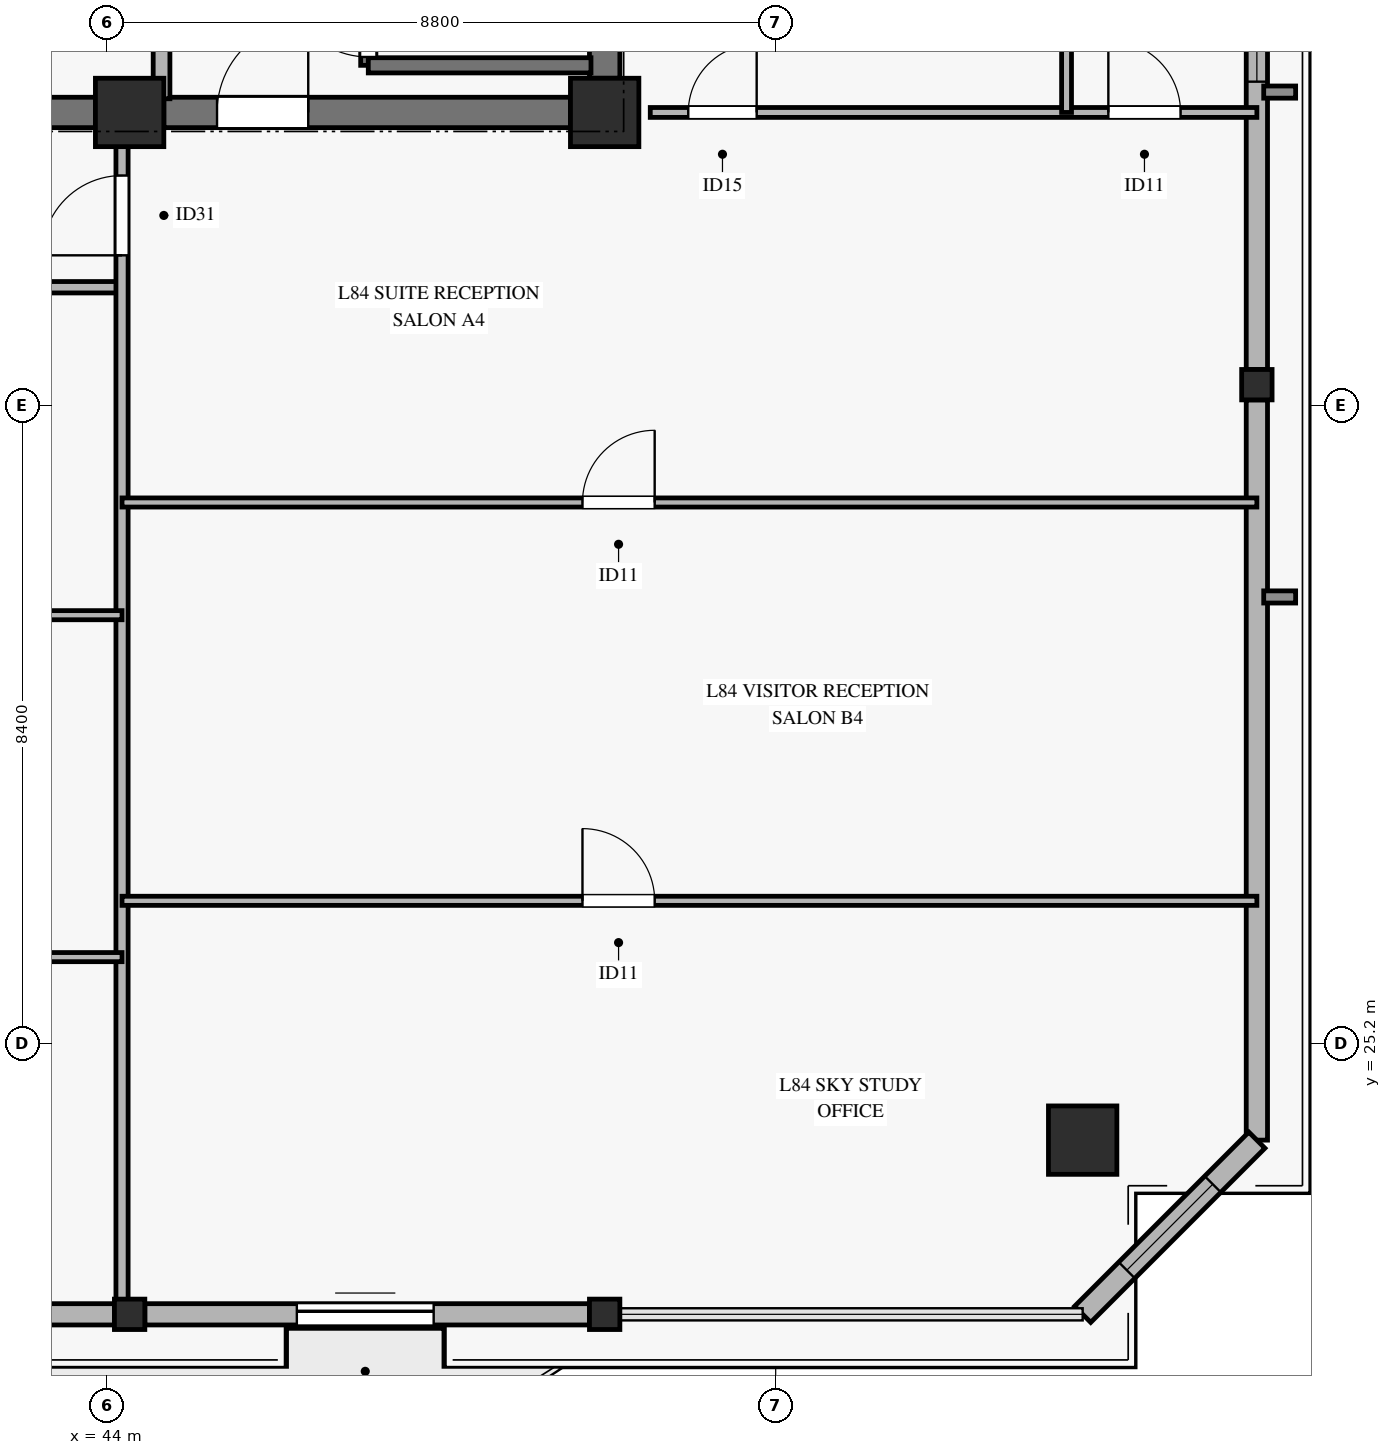
"""IFC4 building model, lengths in metres.
Left out: names, types, materials, properties, quantities, classifications, styles, units other than length and angle.
Written with IfcOpenShell. Run it as: python <this file> out.ifc"""

import sys

from ifc_helpers import new_model, si_unit, direction, frame, frame_2d, origin, origin_2d, place, context, subcontext, project, spatial, rectangle, hollow_rectangle, extrude, source, transform, mapped, element, fill, save


model = new_model("IFC4")
c1 = context("Model", 3, precision=1e-05, world=origin(), true_north=direction((0.0, 1.0)))
c2 = subcontext(c1, "Body", "Model", "MODEL_VIEW")
j1 = project(units=[si_unit("LENGTHUNIT", "METRE"), si_unit("PLANEANGLEUNIT", "RADIAN")], contexts=[c1])
p1 = place(None, origin())
s1 = spatial("IfcSite", under=j1, at=p1, CompositionType="ELEMENT")
p2 = place(p1, origin())
s2 = spatial("IfcBuilding", under=s1, at=p2, CompositionType="ELEMENT")
p3 = place(p2, frame((0.0, 0.0, 324.4)))
s3 = spatial("IfcBuildingStorey", under=s2, at=p3, CompositionType="ELEMENT", Elevation=324.4)
m1 = source(origin(), c2, "Body", "SweptSolid", [
    extrude(rectangle(XDim=0.9, YDim=0.9, at=origin_2d()), origin(), (0.0, 0.0, 1.0), 3.12),
])
for number, where, z_axis, x_axis in (
    (1, (44.3, 37.45, 0.0), (0.0, 0.0, 1.0), (1.0, 0.0, 0.0)),
    (2, (50.55, 37.45, 0.0), (0.0, 0.0, 1.0), (1.0, 0.0, 0.0)),
):
    element("IfcColumn", number, at=place(p3, frame(where, z_axis=z_axis, x_axis=x_axis)), inside=s3, PredefinedType="PILASTER", context=c2, shape_type="MappedRepresentation", body=[
        mapped(m1, transform((0.0, 0.0, 0.0), x_axis=(1.0, 0.0, 0.0), y_axis=(0.0, 1.0, 0.0), z_axis=(0.0, 0.0, 1.0), scale=1.0)),
    ])
p4 = place(p3, frame((36.05, 37.45, 0.0), z_axis=(0.0, 0.0, 1.0), x_axis=(1.0, 0.0, 0.0)))
e3 = element("IfcWall", 3, at=p4, inside=s3, PredefinedType="SHEAR", context=c2, shape_type="SweptSolid", body=[
    extrude(rectangle(XDim=7.8, YDim=0.4, at=frame_2d((3.9, 0.0))), origin(), (0.0, 0.0, 1.0), 3.12),
])
p5 = place(p3, frame((44.75, 37.45, 0.0), z_axis=(0.0, 0.0, 1.0), x_axis=(1.0, 0.0, 0.0)))
e4 = element("IfcWall", 4, at=p5, inside=s3, PredefinedType="SHEAR", context=c2, shape_type="SweptSolid", body=[
    extrude(rectangle(XDim=5.35, YDim=0.4, at=frame_2d((2.675, 0.0))), origin(), (0.0, 0.0, 1.0), 3.12),
])
p6 = place(p5, frame((0.7, 0.0, 0.0)))
e5 = element("IfcOpeningElement", 5, at=p6, cuts=e4, PredefinedType="OPENING", context=c2, shape_type="SweptSolid", body=[
    extrude(rectangle(XDim=1.2, YDim=2.15, at=frame_2d((0.6, 1.075))), frame((0.0, 0.21, 0.0), z_axis=(0.0, -1.0, 0.0), x_axis=(1.0, 0.0, 0.0)), (0.0, 0.0, 1.0), 0.42),
])
p7 = place(p3, frame((50.55, 37.9, 0.0), z_axis=(0.0, 0.0, 1.0), x_axis=(0.0, 1.0, 0.0)))
e6 = element("IfcWall", 6, at=p7, inside=s3, PredefinedType="SHEAR", context=c2, shape_type="SweptSolid", body=[
    extrude(rectangle(XDim=8.2, YDim=0.4, at=frame_2d((4.1, 0.0))), origin(), (0.0, 0.0, 1.0), 3.12),
])
m2 = source(origin(), c2, "Body", "SweptSolid", [
    extrude(hollow_rectangle(XDim=0.9, YDim=0.9, WallThickness=0.04, at=origin_2d()), origin(), (0.0, 0.0, 1.0), 3.12),
])
p8 = place(p3, frame((56.839, 23.928, 0.0), z_axis=(0.0, 0.0, 1.0), x_axis=(1.0, 0.0, 0.0)))
e7 = element("IfcColumn", 7, at=p8, inside=s3, PredefinedType="COLUMN", context=c2, shape_type="MappedRepresentation", body=[
    mapped(m2, transform((0.0, 0.0, 0.0), x_axis=(1.0, 0.0, 0.0), y_axis=(0.0, 1.0, 0.0), z_axis=(0.0, 0.0, 1.0), scale=1.0)),
])
m3 = source(origin(), c2, "Body", "SweptSolid", [
    extrude(hollow_rectangle(XDim=0.4, YDim=0.4, WallThickness=0.02, at=origin_2d()), origin(), (0.0, 0.0, 1.0), 3.12),
])
for number, where, z_axis, x_axis in (
    (8, (44.3, 21.636, 0.0), (0.0, 0.0, 1.0), (1.0, 0.0, 0.0)),
    (9, (50.55, 21.636, 0.0), (0.0, 0.0, 1.0), (1.0, 0.0, 0.0)),
    (10, (59.131, 33.868, 0.0), (0.0, 0.0, 1.0), (1.0, 0.0, 0.0)),
):
    element("IfcColumn", number, at=place(p3, frame(where, z_axis=z_axis, x_axis=x_axis)), inside=s3, PredefinedType="COLUMN", context=c2, shape_type="MappedRepresentation", body=[
        mapped(m3, transform((0.0, 0.0, 0.0), x_axis=(1.0, 0.0, 0.0), y_axis=(0.0, 1.0, 0.0), z_axis=(0.0, 0.0, 1.0), scale=1.0)),
    ])
p9 = place(p3, frame((37.75, 21.636, 0.0), z_axis=(0.0, 0.0, 1.0), x_axis=(1.0, 0.0, 0.0)))
e11 = element("IfcWall", 11, at=p9, inside=s3, PredefinedType="SOLIDWALL", context=c2, shape_type="SweptSolid", body=[
    extrude(rectangle(XDim=6.35, YDim=0.28, at=frame_2d((3.175, 0.0))), origin(), (0.0, 0.0, 1.0), 2.75),
])
p10 = place(p3, frame((44.5, 21.636, 0.0), z_axis=(0.0, 0.0, 1.0), x_axis=(1.0, 0.0, 0.0)))
e12 = element("IfcWall", 12, at=p10, inside=s3, PredefinedType="SOLIDWALL", context=c2, shape_type="SweptSolid", body=[
    extrude(rectangle(XDim=5.85, YDim=0.28, at=frame_2d((2.925, 0.0))), origin(), (0.0, 0.0, 1.0), 2.75),
])
p11 = place(p10, frame((2.0, 0.0, 0.0)))
e13 = element("IfcOpeningElement", 13, at=p11, cuts=e12, PredefinedType="OPENING", context=c2, shape_type="SweptSolid", body=[
    extrude(rectangle(XDim=1.8, YDim=2.25, at=frame_2d((0.9, 1.125))), frame((0.0, 0.15, 0.0), z_axis=(0.0, -1.0, 0.0), x_axis=(1.0, 0.0, 0.0)), (0.0, 0.0, 1.0), 0.3),
])
p12 = place(p3, frame((59.131, 23.928, 0.0), z_axis=(0.0, 0.0, 1.0), x_axis=(0.0, 1.0, 0.0)))
e14 = element("IfcWall", 14, at=p12, inside=s3, PredefinedType="SOLIDWALL", context=c2, shape_type="SweptSolid", body=[
    extrude(rectangle(XDim=9.74, YDim=0.28, at=frame_2d((4.87, 0.0))), origin(), (0.0, 0.0, 1.0), 2.75),
])
p13 = place(p3, frame((59.131, 34.068, 0.0), z_axis=(0.0, 0.0, 1.0), x_axis=(0.0, 1.0, 0.0)))
e15 = element("IfcWall", 15, at=p13, inside=s3, PredefinedType="SOLIDWALL", context=c2, shape_type="SweptSolid", body=[
    extrude(rectangle(XDim=9.74, YDim=0.28, at=frame_2d((4.87, 0.0))), origin(), (0.0, 0.0, 1.0), 2.75),
])
p14 = place(p13, frame((3.787, 0.0, 0.45)))
e16 = element("IfcOpeningElement", 16, at=p14, cuts=e15, PredefinedType="OPENING", context=c2, shape_type="SweptSolid", body=[
    extrude(rectangle(XDim=2.2, YDim=2.1, at=frame_2d((1.1, 1.05))), frame((0.0, 0.15, 0.0), z_axis=(0.0, -1.0, 0.0), x_axis=(1.0, 0.0, 0.0)), (0.0, 0.0, 1.0), 0.3),
])
p15 = place(p3, frame((56.839, 21.636, 0.0), z_axis=(0.0, 0.0, 1.0), x_axis=(0.707106781187, 0.707106781187, 0.0)))
e17 = element("IfcWall", 17, at=p15, inside=s3, PredefinedType="SOLIDWALL", context=c2, shape_type="SweptSolid", body=[
    extrude(rectangle(XDim=3.241, YDim=0.3, at=frame_2d((1.621, 0.0))), origin(), (0.0, 0.0, 1.0), 2.75),
])
p16 = place(p15, frame((0.821, 0.0, 0.45)))
e18 = element("IfcOpeningElement", 18, at=p16, cuts=e17, PredefinedType="OPENING", context=c2, shape_type="SweptSolid", body=[
    extrude(rectangle(XDim=1.6, YDim=2.0, at=frame_2d((0.8, 1.0))), frame((0.0, 0.16, 0.0), z_axis=(0.0, -1.0, 0.0), x_axis=(1.0, 0.0, 0.0)), (0.0, 0.0, 1.0), 0.32),
])
p17 = place(p3, frame((47.44, 38.07, 0.0), z_axis=(0.0, 0.0, 1.0), x_axis=(0.0, 1.0, 0.0)))
e19 = element("IfcWall", 19, at=p17, inside=s3, PredefinedType="SOLIDWALL", context=c2, shape_type="SweptSolid", body=[
    extrude(rectangle(XDim=7.25, YDim=0.2, at=frame_2d((3.625, 0.0))), origin(), (0.0, 0.0, 1.0), 3.4),
])
p18 = place(p17, frame((0.11, 0.0, 0.0)))
e20 = element("IfcOpeningElement", 20, at=p18, cuts=e19, PredefinedType="OPENING", context=c2, shape_type="SweptSolid", body=[
    extrude(rectangle(XDim=1.1, YDim=2.15, at=frame_2d((0.55, 1.075))), frame((0.0, 0.11, 0.0), z_axis=(0.0, -1.0, 0.0), x_axis=(1.0, 0.0, 0.0)), (0.0, 0.0, 1.0), 0.22),
])
p19 = place(p3, frame((47.44, 38.07, 0.0), z_axis=(0.0, 0.0, 1.0), x_axis=(1.0, 0.0, 0.0)))
e21 = element("IfcWall", 21, at=p19, inside=s3, PredefinedType="SOLIDWALL", context=c2, shape_type="SweptSolid", body=[
    extrude(rectangle(XDim=2.93, YDim=0.2, at=frame_2d((1.465, 0.0))), origin(), (0.0, 0.0, 1.0), 3.4),
])
p20 = place(p3, frame((44.72, 37.63, 0.0), z_axis=(0.0, 0.0, 1.0), x_axis=(0.0, 1.0, 0.0)))
e22 = element("IfcWall", 22, at=p20, inside=s3, PredefinedType="SOLIDWALL", context=c2, shape_type="SweptSolid", body=[
    extrude(rectangle(XDim=7.59, YDim=0.22, at=frame_2d((3.795, 0.0))), origin(), (0.0, 0.0, 1.0), 3.12),
])
p21 = place(p3, frame((21.0, 35.15, 0.0), z_axis=(0.0, 0.0, 1.0), x_axis=(1.0, 0.0, 0.0)))
e23 = element("IfcWall", 23, at=p21, inside=s3, PredefinedType="PARTITIONING", context=c2, shape_type="SweptSolid", body=[
    extrude(rectangle(XDim=23.2, YDim=0.15, at=frame_2d((11.6, 0.0))), origin(), (0.0, 0.0, 1.0), 2.405),
])
p22 = place(p21, frame((4.577, 0.0, 0.0)))
e24 = element("IfcOpeningElement", 24, at=p22, cuts=e23, PredefinedType="OPENING", context=c2, shape_type="SweptSolid", body=[
    extrude(rectangle(XDim=1.05, YDim=2.15, at=frame_2d((0.525, 1.075))), frame((0.0, 0.085, 0.0), z_axis=(0.0, -1.0, 0.0), x_axis=(1.0, 0.0, 0.0)), (0.0, 0.0, 1.0), 0.17),
])
p23 = place(p21, frame((16.177, 0.0, 0.0)))
e25 = element("IfcOpeningElement", 25, at=p23, cuts=e23, PredefinedType="OPENING", context=c2, shape_type="SweptSolid", body=[
    extrude(rectangle(XDim=1.05, YDim=2.15, at=frame_2d((0.525, 1.075))), frame((0.0, 0.085, 0.0), z_axis=(0.0, -1.0, 0.0), x_axis=(1.0, 0.0, 0.0)), (0.0, 0.0, 1.0), 0.17),
])
p24 = place(p3, frame((44.2, 21.636, 0.0), z_axis=(0.0, 0.0, 1.0), x_axis=(0.0, 1.0, 0.0)))
e26 = element("IfcWall", 26, at=p24, inside=s3, PredefinedType="PARTITIONING", context=c2, shape_type="SweptSolid", body=[
    extrude(rectangle(XDim=15.814, YDim=0.16, at=frame_2d((7.907, 0.0))), origin(), (0.0, 0.0, 1.0), 2.405),
])
p25 = place(p24, frame((13.934, 0.0, 0.0)))
e27 = element("IfcOpeningElement", 27, at=p25, cuts=e26, PredefinedType="OPENING", context=c2, shape_type="SweptSolid", body=[
    extrude(rectangle(XDim=1.05, YDim=2.15, at=frame_2d((0.525, 1.075))), frame((0.0, 0.09, 0.0), z_axis=(0.0, -1.0, 0.0), x_axis=(1.0, 0.0, 0.0)), (0.0, 0.0, 1.0), 0.18),
])
p26 = place(p3, frame((32.6, 26.336, 0.0), z_axis=(0.0, 0.0, 1.0), x_axis=(1.0, 0.0, 0.0)))
e28 = element("IfcWall", 28, at=p26, inside=s3, PredefinedType="PARTITIONING", context=c2, shape_type="SweptSolid", body=[
    extrude(rectangle(XDim=11.6, YDim=0.12, at=frame_2d((5.8, 0.0))), origin(), (0.0, 0.0, 1.0), 2.405),
])
p27 = place(p26, frame((4.806, 0.0, 0.0)))
e29 = element("IfcOpeningElement", 29, at=p27, cuts=e28, PredefinedType="OPENING", context=c2, shape_type="SweptSolid", body=[
    extrude(rectangle(XDim=0.95, YDim=2.1, at=frame_2d((0.475, 1.05))), frame((0.0, 0.07, 0.0), z_axis=(0.0, -1.0, 0.0), x_axis=(1.0, 0.0, 0.0)), (0.0, 0.0, 1.0), 0.14),
])
p28 = place(p3, frame((32.6, 30.835, 0.0), z_axis=(0.0, 0.0, 1.0), x_axis=(1.0, 0.0, 0.0)))
e30 = element("IfcWall", 30, at=p28, inside=s3, PredefinedType="PARTITIONING", context=c2, shape_type="SweptSolid", body=[
    extrude(rectangle(XDim=11.6, YDim=0.12, at=frame_2d((5.8, 0.0))), origin(), (0.0, 0.0, 1.0), 2.405),
])
p29 = place(p28, frame((4.806, 0.0, 0.0)))
e31 = element("IfcOpeningElement", 31, at=p29, cuts=e30, PredefinedType="OPENING", context=c2, shape_type="SweptSolid", body=[
    extrude(rectangle(XDim=0.95, YDim=2.1, at=frame_2d((0.475, 1.05))), frame((0.0, 0.07, 0.0), z_axis=(0.0, -1.0, 0.0), x_axis=(1.0, 0.0, 0.0)), (0.0, 0.0, 1.0), 0.14),
])
p30 = place(p3, frame((44.2, 27.077, 0.0), z_axis=(0.0, 0.0, 1.0), x_axis=(1.0, 0.0, 0.0)))
e32 = element("IfcWall", 32, at=p30, inside=s3, PredefinedType="PARTITIONING", context=c2, shape_type="SweptSolid", body=[
    extrude(rectangle(XDim=14.931, YDim=0.12, at=frame_2d((7.466, 0.0))), origin(), (0.0, 0.0, 1.0), 2.405),
])
p31 = place(p30, frame((6.058, 0.0, 0.0)))
e33 = element("IfcOpeningElement", 33, at=p31, cuts=e32, PredefinedType="OPENING", context=c2, shape_type="SweptSolid", body=[
    extrude(rectangle(XDim=0.95, YDim=2.1, at=frame_2d((0.475, 1.05))), frame((0.0, 0.07, 0.0), z_axis=(0.0, -1.0, 0.0), x_axis=(1.0, 0.0, 0.0)), (0.0, 0.0, 1.0), 0.14),
])
p32 = place(p3, frame((44.2, 32.318, 0.0), z_axis=(0.0, 0.0, 1.0), x_axis=(1.0, 0.0, 0.0)))
e34 = element("IfcWall", 34, at=p32, inside=s3, PredefinedType="PARTITIONING", context=c2, shape_type="SweptSolid", body=[
    extrude(rectangle(XDim=14.931, YDim=0.12, at=frame_2d((7.466, 0.0))), origin(), (0.0, 0.0, 1.0), 2.405),
])
p33 = place(p32, frame((6.058, 0.0, 0.0)))
e35 = element("IfcOpeningElement", 35, at=p33, cuts=e34, PredefinedType="OPENING", context=c2, shape_type="SweptSolid", body=[
    extrude(rectangle(XDim=0.95, YDim=2.1, at=frame_2d((0.475, 1.05))), frame((0.0, 0.07, 0.0), z_axis=(0.0, -1.0, 0.0), x_axis=(1.0, 0.0, 0.0)), (0.0, 0.0, 1.0), 0.14),
])
p34 = place(p3, frame((51.15, 37.45, 0.0), z_axis=(0.0, 0.0, 1.0), x_axis=(1.0, 0.0, 0.0)))
e36 = element("IfcWall", 36, at=p34, inside=s3, PredefinedType="PARTITIONING", context=c2, shape_type="SweptSolid", body=[
    extrude(rectangle(XDim=7.981, YDim=0.13, at=frame_2d((3.991, 0.0))), origin(), (0.0, 0.0, 1.0), 2.755),
])
p35 = place(p34, frame((0.5, 0.0, 0.0)))
e37 = element("IfcOpeningElement", 37, at=p35, cuts=e36, PredefinedType="OPENING", context=c2, shape_type="SweptSolid", body=[
    extrude(rectangle(XDim=0.9, YDim=2.1, at=frame_2d((0.45, 1.05))), frame((0.0, 0.075, 0.0), z_axis=(0.0, -1.0, 0.0), x_axis=(1.0, 0.0, 0.0)), (0.0, 0.0, 1.0), 0.15),
])
p36 = place(p34, frame((6.027, 0.0, 0.0)))
e38 = element("IfcOpeningElement", 38, at=p36, cuts=e36, PredefinedType="OPENING", context=c2, shape_type="SweptSolid", body=[
    extrude(rectangle(XDim=0.95, YDim=2.1, at=frame_2d((0.475, 1.05))), frame((0.0, 0.075, 0.0), z_axis=(0.0, -1.0, 0.0), x_axis=(1.0, 0.0, 0.0)), (0.0, 0.0, 1.0), 0.15),
])
p37 = place(p3, frame((56.627, 37.45, 0.0), z_axis=(0.0, 0.0, 1.0), x_axis=(0.0, 1.0, 0.0)))
e39 = element("IfcWall", 39, at=p37, inside=s3, PredefinedType="PARTITIONING", context=c2, shape_type="SweptSolid", body=[
    extrude(rectangle(XDim=8.8, YDim=0.13, at=frame_2d((4.4, 0.0))), origin(), (0.0, 0.0, 1.0), 3.12),
])
m4 = source(origin(), c2, "Body", "SweptSolid", [
    extrude(rectangle(XDim=1.8, YDim=2.25, at=frame_2d((0.9, 1.125))), frame((0.0, 0.025, 0.0), z_axis=(0.0, -1.0, 0.0), x_axis=(1.0, 0.0, 0.0)), (0.0, 0.0, 1.0), 0.05),
])
p38 = place(p11, origin())
e40 = element("IfcDoor", 40, at=p38, inside=s3, OperationType="SLIDING_TO_LEFT", PredefinedType="DOOR", context=c2, shape_type="MappedRepresentation", body=[
    mapped(m4, transform((0.0, 0.0, 0.0), x_axis=(1.0, 0.0, 0.0), y_axis=(0.0, 1.0, 0.0), z_axis=(0.0, 0.0, 1.0), scale=1.0)),
])
fill(e13, e40)
m5 = source(origin(), c2, "Body", "SweptSolid", [
    extrude(rectangle(XDim=2.2, YDim=2.1, at=frame_2d((1.1, 1.05))), frame((0.0, 0.03, 0.0), z_axis=(0.0, -1.0, 0.0), x_axis=(1.0, 0.0, 0.0)), (0.0, 0.0, 1.0), 0.06),
])
p39 = place(p14, origin())
e41 = element("IfcWindow", 41, at=p39, inside=s3, PartitioningType="SINGLE_PANEL", PredefinedType="WINDOW", context=c2, shape_type="MappedRepresentation", body=[
    mapped(m5, transform((0.0, 0.0, 0.0), x_axis=(1.0, 0.0, 0.0), y_axis=(0.0, 1.0, 0.0), z_axis=(0.0, 0.0, 1.0), scale=1.0)),
])
fill(e16, e41)
m6 = source(origin(), c2, "Body", "SweptSolid", [
    extrude(rectangle(XDim=1.6, YDim=2.0, at=frame_2d((0.8, 1.0))), frame((0.0, 0.03, 0.0), z_axis=(0.0, -1.0, 0.0), x_axis=(1.0, 0.0, 0.0)), (0.0, 0.0, 1.0), 0.06),
])
p40 = place(p16, origin())
e42 = element("IfcWindow", 42, at=p40, inside=s3, PartitioningType="SINGLE_PANEL", PredefinedType="WINDOW", context=c2, shape_type="MappedRepresentation", body=[
    mapped(m6, transform((0.0, 0.0, 0.0), x_axis=(1.0, 0.0, 0.0), y_axis=(0.0, 1.0, 0.0), z_axis=(0.0, 0.0, 1.0), scale=1.0)),
])
fill(e18, e42)
m7 = source(origin(), c2, "Body", "SweptSolid", [
    extrude(rectangle(XDim=1.1, YDim=2.15, at=frame_2d((0.55, 1.075))), frame((0.0, 0.025, 0.0), z_axis=(0.0, -1.0, 0.0), x_axis=(1.0, 0.0, 0.0)), (0.0, 0.0, 1.0), 0.05),
])
p41 = place(p18, origin())
e43 = element("IfcDoor", 43, at=p41, inside=s3, OperationType="SINGLE_SWING_RIGHT", PredefinedType="DOOR", context=c2, shape_type="MappedRepresentation", body=[
    mapped(m7, transform((0.0, 0.0, 0.0), x_axis=(1.0, 0.0, 0.0), y_axis=(0.0, 1.0, 0.0), z_axis=(0.0, 0.0, 1.0), scale=1.0)),
])
fill(e20, e43)
m8 = source(origin(), c2, "Body", "SweptSolid", [
    extrude(rectangle(XDim=1.2, YDim=2.15, at=frame_2d((0.6, 1.075))), frame((0.0, 0.025, 0.0), z_axis=(0.0, -1.0, 0.0), x_axis=(1.0, 0.0, 0.0)), (0.0, 0.0, 1.0), 0.05),
])
p42 = place(p6, origin())
e44 = element("IfcDoor", 44, at=p42, inside=s3, OperationType="SINGLE_SWING_RIGHT", PredefinedType="DOOR", context=c2, shape_type="MappedRepresentation", body=[
    mapped(m8, transform((0.0, 0.0, 0.0), x_axis=(1.0, 0.0, 0.0), y_axis=(0.0, 1.0, 0.0), z_axis=(0.0, 0.0, 1.0), scale=1.0)),
])
fill(e5, e44)
m9 = source(origin(), c2, "Body", "SweptSolid", [
    extrude(rectangle(XDim=1.05, YDim=2.15, at=frame_2d((0.525, 1.075))), frame((0.0, 0.025, 0.0), z_axis=(0.0, -1.0, 0.0), x_axis=(1.0, 0.0, 0.0)), (0.0, 0.0, 1.0), 0.05),
])
p43 = place(p25, origin())
e45 = element("IfcDoor", 45, at=p43, inside=s3, OperationType="SINGLE_SWING_LEFT", PredefinedType="DOOR", context=c2, shape_type="MappedRepresentation", body=[
    mapped(m9, transform((0.0, 0.0, 0.0), x_axis=(1.0, 0.0, 0.0), y_axis=(0.0, 1.0, 0.0), z_axis=(0.0, 0.0, 1.0), scale=1.0)),
])
fill(e27, e45)
m10 = source(origin(), c2, "Body", "SweptSolid", [
    extrude(rectangle(XDim=0.95, YDim=2.1, at=frame_2d((0.475, 1.05))), frame((0.0, 0.025, 0.0), z_axis=(0.0, -1.0, 0.0), x_axis=(1.0, 0.0, 0.0)), (0.0, 0.0, 1.0), 0.05),
])
p44 = place(p33, origin())
e46 = element("IfcDoor", 46, at=p44, inside=s3, OperationType="SINGLE_SWING_RIGHT", PredefinedType="DOOR", context=c2, shape_type="MappedRepresentation", body=[
    mapped(m10, transform((0.0, 0.0, 0.0), x_axis=(1.0, 0.0, 0.0), y_axis=(0.0, 1.0, 0.0), z_axis=(0.0, 0.0, 1.0), scale=1.0)),
])
fill(e35, e46)
p45 = place(p31, origin())
e47 = element("IfcDoor", 47, at=p45, inside=s3, OperationType="SINGLE_SWING_LEFT", PredefinedType="DOOR", context=c2, shape_type="MappedRepresentation", body=[
    mapped(m10, transform((0.0, 0.0, 0.0), x_axis=(1.0, 0.0, 0.0), y_axis=(0.0, 1.0, 0.0), z_axis=(0.0, 0.0, 1.0), scale=1.0)),
])
fill(e33, e47)
m11 = source(origin(), c2, "Body", "SweptSolid", [
    extrude(rectangle(XDim=0.9, YDim=2.1, at=frame_2d((0.45, 1.05))), frame((0.0, 0.025, 0.0), z_axis=(0.0, -1.0, 0.0), x_axis=(1.0, 0.0, 0.0)), (0.0, 0.0, 1.0), 0.05),
])
p46 = place(p35, origin())
e48 = element("IfcDoor", 48, at=p46, inside=s3, OperationType="SINGLE_SWING_RIGHT", PredefinedType="DOOR", context=c2, shape_type="MappedRepresentation", body=[
    mapped(m11, transform((0.0, 0.0, 0.0), x_axis=(1.0, 0.0, 0.0), y_axis=(0.0, 1.0, 0.0), z_axis=(0.0, 0.0, 1.0), scale=1.0)),
])
fill(e37, e48)
p47 = place(p36, origin())
e49 = element("IfcDoor", 49, at=p47, inside=s3, OperationType="SINGLE_SWING_LEFT", PredefinedType="DOOR", context=c2, shape_type="MappedRepresentation", body=[
    mapped(m10, transform((0.0, 0.0, 0.0), x_axis=(1.0, 0.0, 0.0), y_axis=(0.0, 1.0, 0.0), z_axis=(0.0, 0.0, 1.0), scale=1.0)),
])
fill(e38, e49)
save(model, sys.argv[1])
